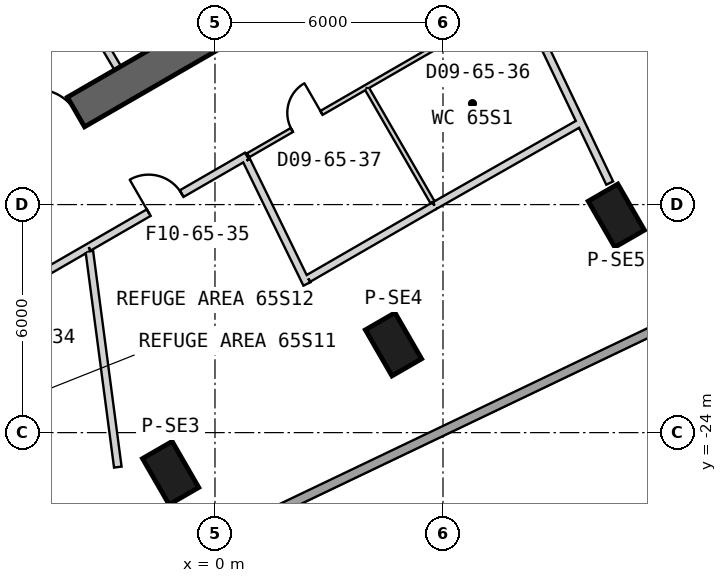
"""IFC4 building model, lengths in metres.
Left out: names, types, materials, properties, quantities, classifications, styles, units other than length and angle.
Written with IfcOpenShell. Run it as: python <this file> out.ifc"""

import sys

from ifc_helpers import new_model, si_unit, direction, frame, frame_2d, origin, origin_2d, place, context, subcontext, project, spatial, rectangle, extrude, element, fill, save


model = new_model("IFC4")
c1 = context("Model", 3, precision=1e-05, world=origin(), true_north=direction((0.0, 1.0)))
c2 = subcontext(c1, "Body", "Model", "MODEL_VIEW")
j1 = project(units=[si_unit("LENGTHUNIT", "METRE"), si_unit("PLANEANGLEUNIT", "RADIAN")], contexts=[c1])
p1 = place(None, origin())
s1 = spatial("IfcSite", under=j1, at=p1, CompositionType="ELEMENT")
p2 = place(p1, origin())
s2 = spatial("IfcBuilding", under=s1, at=p2, CompositionType="ELEMENT")
p3 = place(p2, frame((0.0, 0.0, 292.7)))
s3 = spatial("IfcBuildingStorey", under=s2, at=p3, CompositionType="ELEMENT", Elevation=292.7)
for number, where, z_axis, x_axis in (
    (1, (-1.167, -25.063, 0.0), (0.0, 0.0, 1.0), (0.5, -0.866, 0.0)),
    (2, (4.697, -21.677, 0.0), (0.0, 0.0, 1.0), (0.5, -0.866, 0.0)),
    (3, (10.561, -18.292, 0.0), (0.0, 0.0, 1.0), (0.5, -0.866, 0.0)),
):
    element("IfcColumn", number, at=place(p3, frame(where, z_axis=z_axis, x_axis=x_axis)), inside=s3, PredefinedType="COLUMN", context=c2, shape_type="SweptSolid", body=[
        extrude(rectangle(XDim=1.4, YDim=0.9, at=origin_2d()), origin(), (0.0, 0.0, 1.0), 5.7),
    ])
p4 = place(p3, frame((-7.825, -17.97, 0.0), z_axis=(0.0, 0.0, 1.0), x_axis=(0.866028369851, 0.499994862586, 0.0)))
e4 = element("IfcWall", 4, at=p4, inside=s3, PredefinedType="SHEAR", context=c2, shape_type="SweptSolid", body=[
    extrude(rectangle(XDim=31.523, YDim=0.9, at=frame_2d((15.762, 0.0))), origin(), (0.0, 0.0, 1.0), 6.0),
])
p5 = place(p4, frame((26.712, 0.0, 0.0)))
e5 = element("IfcOpeningElement", 5, at=p5, cuts=e4, PredefinedType="OPENING", context=c2, shape_type="SweptSolid", body=[
    extrude(rectangle(XDim=1.2, YDim=2.4, at=frame_2d((0.6, 1.2))), frame((0.0, 0.46, 0.0), z_axis=(0.0, -1.0, 0.0), x_axis=(1.0, 0.0, 0.0)), (0.0, 0.0, 1.0), 0.92),
])
p6 = place(p4, frame((3.612, 0.0, 0.0)))
e6 = element("IfcOpeningElement", 6, at=p6, cuts=e4, PredefinedType="OPENING", context=c2, shape_type="SweptSolid", body=[
    extrude(rectangle(XDim=1.2, YDim=2.4, at=frame_2d((0.6, 1.2))), frame((0.0, 0.46, 0.0), z_axis=(0.0, -1.0, 0.0), x_axis=(1.0, 0.0, 0.0)), (0.0, 0.0, 1.0), 0.92),
])
p7 = place(p3, frame((-2.998, -28.258, 0.0), z_axis=(0.0, 0.0, 1.0), x_axis=(0.902255372, 0.43120209148, 0.0)))
e7 = element("IfcWall", 7, at=p7, inside=s3, PredefinedType="SOLIDWALL", context=c2, shape_type="SweptSolid", body=[
    extrude(rectangle(XDim=33.548, YDim=0.24, at=frame_2d((16.774, 0.0))), origin(), (0.0, 0.0, 1.0), 5.7),
])
p8 = place(p3, frame((-3.905, -10.563, -0.35), z_axis=(0.0, 0.0, 1.0), x_axis=(-0.500012932018, -0.866017937352, 0.0)))
e8 = element("IfcWall", 8, at=p8, inside=s3, PredefinedType="SHEAR", context=c2, shape_type="SweptSolid", body=[
    extrude(rectangle(XDim=8.1, YDim=0.2, at=frame_2d((4.05, 0.0))), origin(), (0.0, 0.0, 1.0), 6.05),
])
p9 = place(p3, frame((-4.26, -11.524, 0.0), z_axis=(0.0, 0.0, 1.0), x_axis=(0.507997497166, -0.861358544901, 0.0)))
e9 = element("IfcWall", 9, at=p9, inside=s3, PredefinedType="PARTITIONING", context=c2, shape_type="SweptSolid", body=[
    extrude(rectangle(XDim=3.35, YDim=0.2, at=frame_2d((1.675, 0.0))), origin(), (0.0, 0.0, 1.0), 5.7),
])
p10 = place(p3, frame((-6.61, -21.021, 0.0), z_axis=(0.0, 0.0, 1.0), x_axis=(0.866014229038, 0.500019354728, 0.0)))
e10 = element("IfcWall", 10, at=p10, inside=s3, PredefinedType="PARTITIONING", context=c2, shape_type="SweptSolid", body=[
    extrude(rectangle(XDim=3.796, YDim=0.2, at=frame_2d((1.898, 0.0))), origin(), (0.0, 0.0, 1.0), 4.98),
])
p11 = place(p10, frame((1.3, 0.0, 0.0)))
e11 = element("IfcOpeningElement", 11, at=p11, cuts=e10, PredefinedType="OPENING", context=c2, shape_type="SweptSolid", body=[
    extrude(rectangle(XDim=1.0, YDim=2.1, at=frame_2d((0.5, 1.05))), frame((0.0, 0.11, 0.0), z_axis=(0.0, -1.0, 0.0), x_axis=(1.0, 0.0, 0.0)), (0.0, 0.0, 1.0), 0.22),
])
p12 = place(p3, frame((-3.322, -19.123, 0.0), z_axis=(0.0, 0.0, 1.0), x_axis=(0.866020577108, 0.500008359956, 0.0)))
e12 = element("IfcWall", 12, at=p12, inside=s3, PredefinedType="PARTITIONING", context=c2, shape_type="SweptSolid", body=[
    extrude(rectangle(XDim=4.805, YDim=0.2, at=frame_2d((2.402, 0.0))), origin(), (0.0, 0.0, 1.0), 5.07),
])
p13 = place(p12, frame((1.822, 0.0, 0.0)))
e13 = element("IfcOpeningElement", 13, at=p13, cuts=e12, PredefinedType="OPENING", context=c2, shape_type="SweptSolid", body=[
    extrude(rectangle(XDim=1.0, YDim=2.1, at=frame_2d((0.5, 1.05))), frame((0.0, 0.11, 0.0), z_axis=(0.0, -1.0, 0.0), x_axis=(1.0, 0.0, 0.0)), (0.0, 0.0, 1.0), 0.22),
])
p14 = place(p3, frame((0.874, -16.701, 0.0), z_axis=(0.0, 0.0, 1.0), x_axis=(0.866019870564, 0.500009583697, 0.0)))
e14 = element("IfcWall", 14, at=p14, inside=s3, PredefinedType="PARTITIONING", context=c2, shape_type="SweptSolid", body=[
    extrude(rectangle(XDim=3.582, YDim=0.12, at=frame_2d((1.791, 0.0))), origin(), (0.0, 0.0, 1.0), 5.07),
])
p15 = place(p14, frame((1.327, 0.0, 0.0)))
e15 = element("IfcOpeningElement", 15, at=p15, cuts=e14, PredefinedType="OPENING", context=c2, shape_type="SweptSolid", body=[
    extrude(rectangle(XDim=0.9, YDim=2.1, at=frame_2d((0.45, 1.05))), frame((0.0, 0.07, 0.0), z_axis=(0.0, -1.0, 0.0), x_axis=(1.0, 0.0, 0.0)), (0.0, 0.0, 1.0), 0.14),
])
p16 = place(p3, frame((3.976, -14.91, 0.0), z_axis=(0.0, 0.0, 1.0), x_axis=(0.866022745717, 0.500004603879, 0.0)))
e16 = element("IfcWall", 16, at=p16, inside=s3, PredefinedType="PARTITIONING", context=c2, shape_type="SweptSolid", body=[
    extrude(rectangle(XDim=4.694, YDim=0.12, at=frame_2d((2.347, 0.0))), origin(), (0.0, 0.0, 1.0), 5.07),
])
p17 = place(p16, frame((1.97, 0.0, 0.0)))
e17 = element("IfcOpeningElement", 17, at=p17, cuts=e16, PredefinedType="OPENING", context=c2, shape_type="SweptSolid", body=[
    extrude(rectangle(XDim=0.9, YDim=2.1, at=frame_2d((0.45, 1.05))), frame((0.0, 0.07, 0.0), z_axis=(0.0, -1.0, 0.0), x_axis=(1.0, 0.0, 0.0)), (0.0, 0.0, 1.0), 0.14),
])
p18 = place(p3, frame((-3.306, -19.229, 0.0), z_axis=(0.0, 0.0, 1.0), x_axis=(0.130789743481, -0.991410128554, 0.0)))
e18 = element("IfcWall", 18, at=p18, inside=s3, PredefinedType="PARTITIONING", context=c2, shape_type="SweptSolid", body=[
    extrude(rectangle(XDim=5.727, YDim=0.2, at=frame_2d((2.863, 0.0))), origin(), (0.0, 0.0, 1.0), 5.7),
])
p19 = place(p3, frame((2.457, -19.944, 0.0), z_axis=(0.0, 0.0, 1.0), x_axis=(0.866027525232, 0.499996325527, 0.0)))
e19 = element("IfcWall", 19, at=p19, inside=s3, PredefinedType="PARTITIONING", context=c2, shape_type="SweptSolid", body=[
    extrude(rectangle(XDim=3.833, YDim=0.2, at=frame_2d((1.916, 0.0))), origin(), (0.0, 0.0, 1.0), 5.07),
])
p20 = place(p3, frame((5.776, -18.028, 0.0), z_axis=(0.0, 0.0, 1.0), x_axis=(0.869329804733, 0.494232425689, 0.0)))
e20 = element("IfcWall", 20, at=p20, inside=s3, PredefinedType="PARTITIONING", context=c2, shape_type="SweptSolid", body=[
    extrude(rectangle(XDim=4.457, YDim=0.2, at=frame_2d((2.229, 0.0))), origin(), (0.0, 0.0, 1.0), 5.07),
])
p21 = place(p3, frame((2.417, -20.09, 0.0), z_axis=(0.0, 0.0, 1.0), x_axis=(-0.438685684161, 0.898640568032, 0.0)))
e21 = element("IfcWall", 21, at=p21, inside=s3, PredefinedType="PARTITIONING", context=c2, shape_type="SweptSolid", body=[
    extrude(rectangle(XDim=3.616, YDim=0.2, at=frame_2d((1.808, 0.0))), origin(), (0.0, 0.0, 1.0), 5.7),
])
p22 = place(p3, frame((10.387, -17.434, 0.0), z_axis=(0.0, 0.0, 1.0), x_axis=(-0.431219922103, 0.902246850248, 0.0)))
e22 = element("IfcWall", 22, at=p22, inside=s3, PredefinedType="PARTITIONING", context=c2, shape_type="SweptSolid", body=[
    extrude(rectangle(XDim=1.797, YDim=0.2, at=frame_2d((0.898, 0.0))), origin(), (0.0, 0.0, 1.0), 5.7),
])
p23 = place(p3, frame((4.006, -14.961, 0.0), z_axis=(0.0, 0.0, 1.0), x_axis=(0.499978425106, -0.866037859697, 0.0)))
e23 = element("IfcWall", 23, at=p23, inside=s3, PredefinedType="PARTITIONING", context=c2, shape_type="SweptSolid", body=[
    extrude(rectangle(XDim=3.44, YDim=0.12, at=frame_2d((1.72, 0.0))), origin(), (0.0, 0.0, 1.0), 5.7),
])
p24 = place(p3, frame((8.081, -12.609, 0.0), z_axis=(0.0, 0.0, 1.0), x_axis=(0.431190278895, -0.902261017326, 0.0)))
e24 = element("IfcWall", 24, at=p24, inside=s3, PredefinedType="PARTITIONING", context=c2, shape_type="SweptSolid", body=[
    extrude(rectangle(XDim=3.551, YDim=0.2, at=frame_2d((1.775, 0.0))), origin(), (0.0, 0.0, 1.0), 5.7),
])
p25 = place(p13, origin())
e25 = element("IfcDoor", 25, at=p25, inside=s3, OperationType="SINGLE_SWING_LEFT", PredefinedType="USERDEFINED", context=c2, shape_type="SweptSolid", body=[
    extrude(rectangle(XDim=1.0, YDim=2.1, at=frame_2d((0.5, 1.05))), frame((0.0, 0.025, 0.0), z_axis=(0.0, -1.0, 0.0), x_axis=(1.0, 0.0, 0.0)), (0.0, 0.0, 1.0), 0.05),
])
fill(e13, e25)
p26 = place(p15, origin())
e26 = element("IfcDoor", 26, at=p26, inside=s3, OperationType="SINGLE_SWING_RIGHT", PredefinedType="NOTDEFINED", context=c2, shape_type="SweptSolid", body=[
    extrude(rectangle(XDim=0.9, YDim=2.1, at=frame_2d((0.45, 1.05))), frame((0.0, 0.025, 0.0), z_axis=(0.0, -1.0, 0.0), x_axis=(1.0, 0.0, 0.0)), (0.0, 0.0, 1.0), 0.05),
])
fill(e15, e26)
p27 = place(p6, origin())
e27 = element("IfcDoor", 27, at=p27, inside=s3, OperationType="SINGLE_SWING_LEFT", PredefinedType="USERDEFINED", context=c2, shape_type="SweptSolid", body=[
    extrude(rectangle(XDim=1.2, YDim=2.4, at=frame_2d((0.6, 1.2))), frame((0.0, 0.025, 0.0), z_axis=(0.0, -1.0, 0.0), x_axis=(1.0, 0.0, 0.0)), (0.0, 0.0, 1.0), 0.05),
])
fill(e6, e27)
save(model, sys.argv[1])
